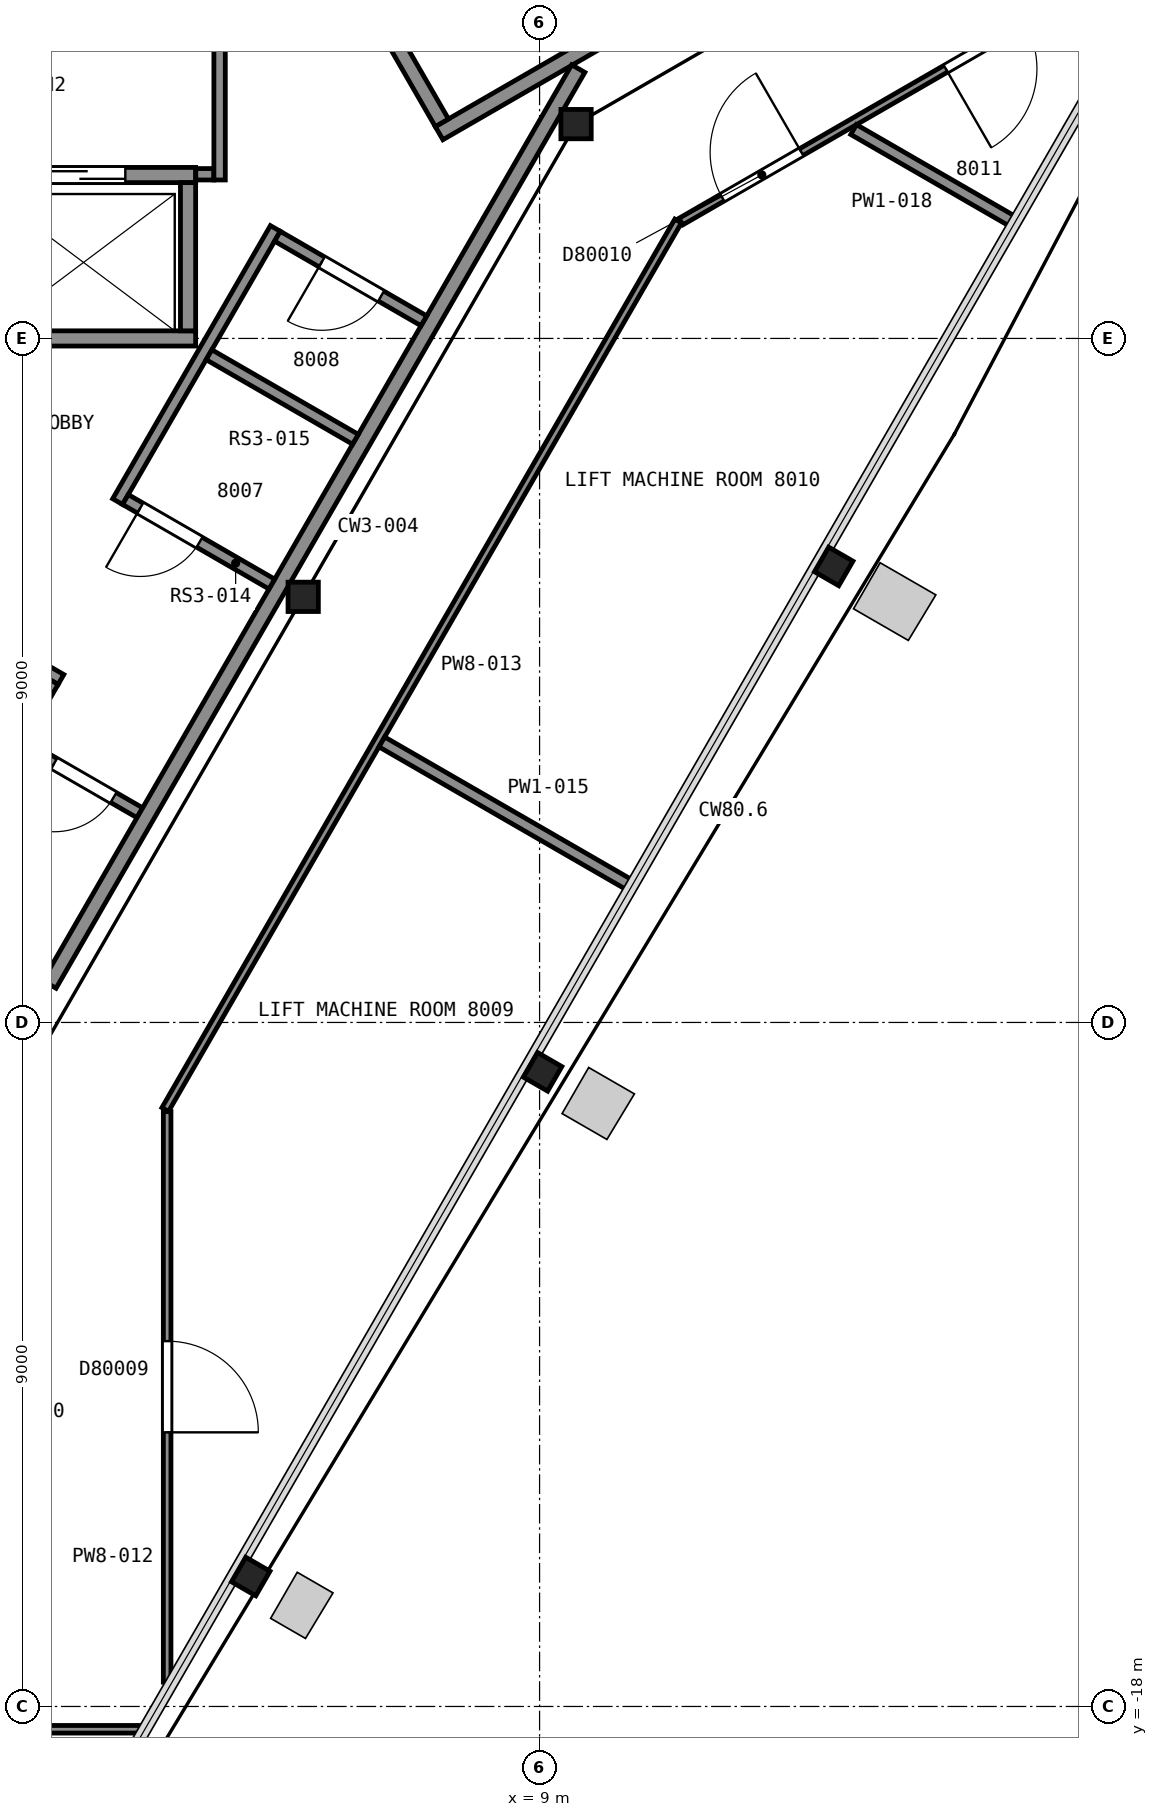
"""IFC4 building model, lengths in metres.
Left out: names, types, materials, properties, quantities, classifications, styles, units other than length and angle.
Written with IfcOpenShell. Run it as: python <this file> out.ifc"""

import sys

from ifc_helpers import new_model, si_unit, direction, frame, frame_2d, origin, origin_2d, place, context, subcontext, project, spatial, rectangle, i_section, extrude, element, fill, save


model = new_model("IFC4")
c1 = context("Model", 3, precision=1e-05, world=origin(), true_north=direction((0.0, 1.0)))
c2 = subcontext(c1, "Body", "Model", "MODEL_VIEW")
j1 = project(units=[si_unit("LENGTHUNIT", "METRE"), si_unit("PLANEANGLEUNIT", "RADIAN")], contexts=[c1])
p1 = place(None, origin())
s1 = spatial("IfcSite", under=j1, at=p1, CompositionType="ELEMENT")
p2 = place(p1, origin())
s2 = spatial("IfcBuilding", under=s1, at=p2, CompositionType="ELEMENT")
p3 = place(p2, frame((0.0, 0.0, 316.8)))
s3 = spatial("IfcBuildingStorey", under=s2, at=p3, CompositionType="ELEMENT", Elevation=316.8)
for number, where, z_axis, x_axis in (
    (1, (5.2, -16.29, 0.0), (0.0, 0.0, 1.0), (-0.5, -0.866, 0.0)),
    (2, (9.04, -9.65, 0.0), (0.0, 0.0, 1.0), (-0.5, -0.866, 0.0)),
    (3, (12.87, -3.0, 0.0), (0.0, 0.0, 1.0), (-0.5, -0.866, 0.0)),
):
    element("IfcColumn", number, at=place(p3, frame(where, z_axis=z_axis, x_axis=x_axis)), inside=s3, PredefinedType="COLUMN", context=c2, shape_type="SweptSolid", body=[
        extrude(i_section(OverallWidth=0.373, OverallDepth=0.368, WebThickness=0.015, FlangeThickness=0.024, FilletRadius=0.015, at=origin_2d()), origin(), (0.0, 0.0, 1.0), 4.2),
    ])
for number, where, z_axis, x_axis in (
    (4, (9.48, 2.82, 0.0), (0.0, 0.0, 1.0), (1.0, 0.0, 0.0)),
    (5, (5.89, -3.4, 0.0), (0.0, 0.0, 1.0), (1.0, 0.0, 0.0)),
):
    element("IfcColumn", number, at=place(p3, frame(where, z_axis=z_axis, x_axis=x_axis)), inside=s3, PredefinedType="COLUMN", context=c2, shape_type="SweptSolid", body=[
        extrude(i_section(OverallWidth=0.399, OverallDepth=0.386, WebThickness=0.021, FlangeThickness=0.033, FilletRadius=0.015, at=origin_2d()), origin(), (0.0, 0.0, 1.0), 4.2),
    ])
p4 = place(p3, frame((7.678, 2.701, 0.0), z_axis=(0.0, 0.0, 1.0), x_axis=(0.866018442252, 0.500012057535, 0.0)))
e6 = element("IfcWall", 6, at=p4, inside=s3, PredefinedType="PARTITIONING", context=c2, shape_type="SweptSolid", body=[
    extrude(rectangle(XDim=7.2, YDim=0.2, at=frame_2d((3.6, 0.0))), origin(), (0.0, 0.0, 1.0), 3.95),
])
p5 = place(p3, frame((7.715, 2.838, 0.0), z_axis=(0.0, 0.0, 1.0), x_axis=(-0.500049511043, 0.865996816683, 0.0)))
e7 = element("IfcWall", 7, at=p5, inside=s3, PredefinedType="PARTITIONING", context=c2, shape_type="SweptSolid", body=[
    extrude(rectangle(XDim=2.8, YDim=0.2, at=frame_2d((1.4, 0.0))), origin(), (0.0, 0.0, 1.0), 3.95),
])
p6 = place(p3, frame((1.525, 0.0, 0.0), z_axis=(0.0, 0.0, 1.0), x_axis=(1.0, 0.0, 0.0)))
e8 = element("IfcWall", 8, at=p6, inside=s3, PredefinedType="PARTITIONING", context=c2, shape_type="SweptSolid", body=[
    extrude(rectangle(XDim=2.95, YDim=0.2, at=frame_2d((1.475, 0.0))), origin(), (0.0, 0.0, 1.0), 4.2),
])
p7 = place(p3, frame((1.525, 2.15, 0.0), z_axis=(0.0, 0.0, 1.0), x_axis=(1.0, 0.0, 0.0)))
e9 = element("IfcWall", 9, at=p7, inside=s3, PredefinedType="PARTITIONING", context=c2, shape_type="SweptSolid", body=[
    extrude(rectangle(XDim=2.95, YDim=0.2, at=frame_2d((1.475, 0.0))), origin(), (0.0, 0.0, 1.0), 4.2),
])
p8 = place(p7, frame((0.925, 0.0, 0.0)))
e10 = element("IfcOpeningElement", 10, at=p8, cuts=e9, PredefinedType="OPENING", context=c2, shape_type="SweptSolid", body=[
    extrude(rectangle(XDim=1.1, YDim=2.1, at=frame_2d((0.55, 1.05))), frame((0.0, 0.11, 0.0), z_axis=(0.0, -1.0, 0.0), x_axis=(1.0, 0.0, 0.0)), (0.0, 0.0, 1.0), 0.22),
])
p9 = place(p3, frame((4.375, 0.1, 0.0), z_axis=(0.0, 0.0, 1.0), x_axis=(0.0, 1.0, 0.0)))
e11 = element("IfcWall", 11, at=p9, inside=s3, PredefinedType="PARTITIONING", context=c2, shape_type="SweptSolid", body=[
    extrude(rectangle(XDim=1.95, YDim=0.2, at=frame_2d((0.975, 0.0))), origin(), (0.0, 0.0, 1.0), 4.2),
])
p10 = place(p3, frame((1.014, -3.512, 0.0), z_axis=(0.0, 0.0, 1.0), x_axis=(0.866000020948, -0.500043961785, 0.0)))
e12 = element("IfcWall", 12, at=p10, inside=s3, PredefinedType="PARTITIONING", context=c2, shape_type="SweptSolid", body=[
    extrude(rectangle(XDim=1.95, YDim=0.15, at=frame_2d((0.975, 0.0))), origin(), (0.0, 0.0, 1.0), 3.95),
])
p11 = place(p3, frame((2.176, -5.251, 0.0), z_axis=(0.0, 0.0, 1.0), x_axis=(0.500062241894, 0.865989465428, 0.0)))
e13 = element("IfcWall", 13, at=p11, inside=s3, PredefinedType="PARTITIONING", context=c2, shape_type="SweptSolid", body=[
    extrude(rectangle(XDim=0.85, YDim=0.15, at=frame_2d((0.425, 0.0))), origin(), (0.0, 0.0, 1.0), 3.95),
])
p12 = place(p3, frame((3.74, -6.241, 0.0), z_axis=(0.0, 0.0, 1.0), x_axis=(-0.86609690551, 0.499876134923, 0.0)))
e14 = element("IfcWall", 14, at=p12, inside=s3, PredefinedType="PARTITIONING", context=c2, shape_type="SweptSolid", body=[
    extrude(rectangle(XDim=1.925, YDim=0.15, at=frame_2d((0.963, 0.0))), origin(), (0.0, 0.0, 1.0), 3.95),
])
p13 = place(p12, frame((0.4, 0.0, 0.0)))
e15 = element("IfcOpeningElement", 15, at=p13, cuts=e14, PredefinedType="OPENING", context=c2, shape_type="SweptSolid", body=[
    extrude(rectangle(XDim=0.9, YDim=2.1, at=frame_2d((0.45, 1.05))), frame((0.0, 0.085, 0.0), z_axis=(0.0, -1.0, 0.0), x_axis=(1.0, 0.0, 0.0)), (0.0, 0.0, 1.0), 0.17),
])
p14 = place(p3, frame((2.552, -8.5, 0.0), z_axis=(0.0, 0.0, 1.0), x_axis=(0.499981156672, 0.866036282712, 0.0)))
e16 = element("IfcWall", 16, at=p14, inside=s3, PredefinedType="PARTITIONING", context=c2, shape_type="SweptSolid", body=[
    extrude(rectangle(XDim=13.915, YDim=0.2, at=frame_2d((6.957, 0.0))), origin(), (0.0, 0.0, 1.0), 3.95),
])
p15 = place(p3, frame((3.448, -2.147, 0.0), z_axis=(0.0, 0.0, 1.0), x_axis=(0.499992353047, 0.86602981871, 0.0)))
e17 = element("IfcWall", 17, at=p15, inside=s3, PredefinedType="PARTITIONING", context=c2, shape_type="SweptSolid", body=[
    extrude(rectangle(XDim=4.15, YDim=0.15, at=frame_2d((2.075, 0.0))), origin(), (0.0, 0.0, 1.0), 3.95),
])
p16 = place(p3, frame((3.551, -2.119, 0.0), z_axis=(0.0, 0.0, 1.0), x_axis=(0.865944298464, -0.500140452231, 0.0)))
e18 = element("IfcWall", 18, at=p16, inside=s3, PredefinedType="PARTITIONING", context=c2, shape_type="SweptSolid", body=[
    extrude(rectangle(XDim=2.224, YDim=0.15, at=frame_2d((1.112, 0.0))), origin(), (0.0, 0.0, 1.0), 3.95),
])
p17 = place(p16, frame((0.225, 0.0, 0.0)))
e19 = element("IfcOpeningElement", 19, at=p17, cuts=e18, PredefinedType="OPENING", context=c2, shape_type="SweptSolid", body=[
    extrude(rectangle(XDim=0.9, YDim=2.1, at=frame_2d((0.45, 1.05))), frame((0.0, 0.085, 0.0), z_axis=(0.0, -1.0, 0.0), x_axis=(1.0, 0.0, 0.0)), (0.0, 0.0, 1.0), 0.17),
])
p18 = place(p3, frame((4.477, 2.16, 0.0), z_axis=(0.0, 0.0, 1.0), x_axis=(1.0, 0.0, 0.0)))
e20 = element("IfcWall", 20, at=p18, inside=s3, PredefinedType="PARTITIONING", context=c2, shape_type="SweptSolid", body=[
    extrude(rectangle(XDim=0.238, YDim=0.15, at=frame_2d((0.119, 0.0))), origin(), (0.0, 0.0, 1.0), 3.95),
])
p19 = place(p3, frame((4.651, -0.215, 0.0), z_axis=(0.0, 0.0, 1.0), x_axis=(0.866019272134, -0.50001062018, 0.0)))
e21 = element("IfcWall", 21, at=p19, inside=s3, PredefinedType="PARTITIONING", context=c2, shape_type="SweptSolid", body=[
    extrude(rectangle(XDim=2.225, YDim=0.15, at=frame_2d((1.112, 0.0))), origin(), (0.0, 0.0, 1.0), 3.95),
])
p20 = place(p3, frame((4.79, 2.085, 0.0), z_axis=(0.0, 0.0, 1.0), x_axis=(0.0, 1.0, 0.0)))
e22 = element("IfcWall", 22, at=p20, inside=s3, PredefinedType="PARTITIONING", context=c2, shape_type="SweptSolid", body=[
    extrude(rectangle(XDim=2.98, YDim=0.15, at=frame_2d((1.49, 0.0))), origin(), (0.0, 0.0, 1.0), 3.95),
])
p21 = place(p3, frame((7.477, 0.232, 0.0), z_axis=(0.0, 0.0, 1.0), x_axis=(-0.865944298464, 0.500140452231, 0.0)))
e23 = element("IfcWall", 23, at=p21, inside=s3, PredefinedType="PARTITIONING", context=c2, shape_type="SweptSolid", body=[
    extrude(rectangle(XDim=2.224, YDim=0.15, at=frame_2d((1.112, 0.0))), origin(), (0.0, 0.0, 1.0), 3.95),
])
p22 = place(p21, frame((0.65, 0.0, 0.0)))
e24 = element("IfcOpeningElement", 24, at=p22, cuts=e23, PredefinedType="OPENING", context=c2, shape_type="SweptSolid", body=[
    extrude(rectangle(XDim=0.9, YDim=2.1, at=frame_2d((0.45, 1.05))), frame((0.0, 0.085, 0.0), z_axis=(0.0, -1.0, 0.0), x_axis=(1.0, 0.0, 0.0)), (0.0, 0.0, 1.0), 0.17),
])
p23 = place(p3, frame((3.763, -18.3, 0.0), z_axis=(0.0, 0.0, 1.0), x_axis=(-1.0, 0.0, 0.0)))
e25 = element("IfcWall", 25, at=p23, inside=s3, PredefinedType="PARTITIONING", context=c2, shape_type="SweptSolid", body=[
    extrude(rectangle(XDim=7.526, YDim=0.1, at=frame_2d((3.763, 0.0))), origin(), (0.0, 0.0, 1.0), 3.297),
])
p24 = place(p23, frame((1.899, 0.0, 0.0)))
e26 = element("IfcOpeningElement", 26, at=p24, cuts=e25, PredefinedType="OPENING", context=c2, shape_type="SweptSolid", body=[
    extrude(rectangle(XDim=1.2, YDim=2.1, at=frame_2d((0.6, 1.05))), frame((0.0, 0.06, 0.0), z_axis=(0.0, -1.0, 0.0), x_axis=(1.0, 0.0, 0.0)), (0.0, 0.0, 1.0), 0.12),
])
p25 = place(p23, frame((5.397, 0.0, 0.0)))
e27 = element("IfcOpeningElement", 27, at=p25, cuts=e25, PredefinedType="OPENING", context=c2, shape_type="SweptSolid", body=[
    extrude(rectangle(XDim=1.5, YDim=2.1, at=frame_2d((0.75, 1.05))), frame((0.0, 0.06, 0.0), z_axis=(0.0, -1.0, 0.0), x_axis=(1.0, 0.0, 0.0)), (0.0, 0.0, 1.0), 0.12),
])
p26 = place(p3, frame((4.1, -10.172, 0.0), z_axis=(0.0, 0.0, 1.0), x_axis=(0.0, -1.0, 0.0)))
e28 = element("IfcWall", 28, at=p26, inside=s3, PredefinedType="PARTITIONING", context=c2, shape_type="SweptSolid", body=[
    extrude(rectangle(XDim=7.508, YDim=0.1, at=frame_2d((3.754, 0.0))), origin(), (0.0, 0.0, 1.0), 3.297),
])
p27 = place(p26, frame((3.021, 0.0, 0.0)))
e29 = element("IfcOpeningElement", 29, at=p27, cuts=e28, PredefinedType="OPENING", context=c2, shape_type="SweptSolid", body=[
    extrude(rectangle(XDim=1.2, YDim=2.1, at=frame_2d((0.6, 1.05))), frame((0.0, 0.06, 0.0), z_axis=(0.0, -1.0, 0.0), x_axis=(1.0, 0.0, 0.0)), (0.0, 0.0, 1.0), 0.12),
])
p28 = place(p3, frame((4.075, -10.145, 0.0), z_axis=(0.0, 0.0, 1.0), x_axis=(0.499912942625, 0.866075660549, 0.0)))
e30 = element("IfcWall", 30, at=p28, inside=s3, PredefinedType="PARTITIONING", context=c2, shape_type="SweptSolid", body=[
    extrude(rectangle(XDim=13.499, YDim=0.1, at=frame_2d((6.749, 0.0))), origin(), (0.0, 0.0, 1.0), 3.297),
])
p29 = place(p3, frame((6.924, -5.309, 0.0), z_axis=(0.0, 0.0, 1.0), x_axis=(0.866029704776, -0.49999255039, 0.0)))
e31 = element("IfcWall", 31, at=p29, inside=s3, PredefinedType="PARTITIONING", context=c2, shape_type="SweptSolid", body=[
    extrude(rectangle(XDim=3.782, YDim=0.15, at=frame_2d((1.891, 0.0))), origin(), (0.0, 0.0, 1.0), 3.297),
])
p30 = place(p3, frame((17.361, 5.29, 0.0), z_axis=(0.0, 0.0, 1.0), x_axis=(-0.866105995393, -0.499860385252, 0.0)))
e32 = element("IfcWall", 32, at=p30, inside=s3, PredefinedType="PARTITIONING", context=c2, shape_type="SweptSolid", body=[
    extrude(rectangle(XDim=7.508, YDim=0.1, at=frame_2d((3.754, 0.0))), origin(), (0.0, 0.0, 1.0), 3.297),
])
p31 = place(p30, frame((5.678, 0.0, 0.0)))
e33 = element("IfcOpeningElement", 33, at=p31, cuts=e32, PredefinedType="OPENING", context=c2, shape_type="SweptSolid", body=[
    extrude(rectangle(XDim=1.2, YDim=2.1, at=frame_2d((0.6, 1.05))), frame((0.0, 0.06, 0.0), z_axis=(0.0, -1.0, 0.0), x_axis=(1.0, 0.0, 0.0)), (0.0, 0.0, 1.0), 0.12),
])
p32 = place(p30, frame((2.284, 0.0, 0.0)))
e34 = element("IfcOpeningElement", 34, at=p32, cuts=e32, PredefinedType="OPENING", context=c2, shape_type="SweptSolid", body=[
    extrude(rectangle(XDim=1.2, YDim=2.1, at=frame_2d((0.6, 1.05))), frame((0.0, 0.06, 0.0), z_axis=(0.0, -1.0, 0.0), x_axis=(1.0, 0.0, 0.0)), (0.0, 0.0, 1.0), 0.12),
])
p33 = place(p3, frame((13.132, 2.749, 0.0), z_axis=(0.0, 0.0, 1.0), x_axis=(0.86593842012, -0.50015062987, 0.0)))
e35 = element("IfcWall", 35, at=p33, inside=s3, PredefinedType="PARTITIONING", context=c2, shape_type="SweptSolid", body=[
    extrude(rectangle(XDim=2.435, YDim=0.15, at=frame_2d((1.217, 0.0))), origin(), (0.0, 0.0, 1.0), 3.297),
])
p34 = place(p8, origin())
e36 = element("IfcDoor", 36, at=p34, inside=s3, OperationType="SLIDING_TO_RIGHT", PredefinedType="DOOR", context=c2, shape_type="SweptSolid", body=[
    extrude(rectangle(XDim=1.1, YDim=2.1, at=frame_2d((0.55, 1.05))), frame((0.0, 0.025, 0.0), z_axis=(0.0, -1.0, 0.0), x_axis=(1.0, 0.0, 0.0)), (0.0, 0.0, 1.0), 0.05),
])
fill(e10, e36)
p35 = place(p13, origin())
e37 = element("IfcDoor", 37, at=p35, inside=s3, OperationType="SINGLE_SWING_RIGHT", PredefinedType="DOOR", context=c2, shape_type="SweptSolid", body=[
    extrude(rectangle(XDim=0.9, YDim=2.1, at=frame_2d((0.45, 1.05))), frame((0.0, 0.025, 0.0), z_axis=(0.0, -1.0, 0.0), x_axis=(1.0, 0.0, 0.0)), (0.0, 0.0, 1.0), 0.05),
])
fill(e15, e37)
p36 = place(p17, origin())
e38 = element("IfcDoor", 38, at=p36, inside=s3, OperationType="SINGLE_SWING_LEFT", PredefinedType="DOOR", context=c2, shape_type="SweptSolid", body=[
    extrude(rectangle(XDim=0.9, YDim=2.1, at=frame_2d((0.45, 1.05))), frame((0.0, 0.025, 0.0), z_axis=(0.0, -1.0, 0.0), x_axis=(1.0, 0.0, 0.0)), (0.0, 0.0, 1.0), 0.05),
])
fill(e19, e38)
p37 = place(p22, origin())
e39 = element("IfcDoor", 39, at=p37, inside=s3, OperationType="SINGLE_SWING_RIGHT", PredefinedType="DOOR", context=c2, shape_type="SweptSolid", body=[
    extrude(rectangle(XDim=0.9, YDim=2.1, at=frame_2d((0.45, 1.05))), frame((0.0, 0.025, 0.0), z_axis=(0.0, -1.0, 0.0), x_axis=(1.0, 0.0, 0.0)), (0.0, 0.0, 1.0), 0.05),
])
fill(e24, e39)
p38 = place(p27, origin())
e40 = element("IfcDoor", 40, at=p38, inside=s3, OperationType="SINGLE_SWING_RIGHT", PredefinedType="DOOR", context=c2, shape_type="SweptSolid", body=[
    extrude(rectangle(XDim=1.2, YDim=2.1, at=frame_2d((0.6, 1.05))), frame((0.0, 0.025, 0.0), z_axis=(0.0, -1.0, 0.0), x_axis=(1.0, 0.0, 0.0)), (0.0, 0.0, 1.0), 0.05),
])
fill(e29, e40)
p39 = place(p31, origin())
e41 = element("IfcDoor", 41, at=p39, inside=s3, OperationType="SINGLE_SWING_LEFT", PredefinedType="DOOR", context=c2, shape_type="SweptSolid", body=[
    extrude(rectangle(XDim=1.2, YDim=2.1, at=frame_2d((0.6, 1.05))), frame((0.0, 0.025, 0.0), z_axis=(0.0, -1.0, 0.0), x_axis=(1.0, 0.0, 0.0)), (0.0, 0.0, 1.0), 0.05),
])
fill(e33, e41)
p40 = place(p32, origin())
e42 = element("IfcDoor", 42, at=p40, inside=s3, OperationType="SINGLE_SWING_RIGHT", PredefinedType="DOOR", context=c2, shape_type="SweptSolid", body=[
    extrude(rectangle(XDim=1.2, YDim=2.1, at=frame_2d((0.6, 1.05))), frame((0.0, 0.025, 0.0), z_axis=(0.0, -1.0, 0.0), x_axis=(1.0, 0.0, 0.0)), (0.0, 0.0, 1.0), 0.05),
])
fill(e34, e42)
save(model, sys.argv[1])
